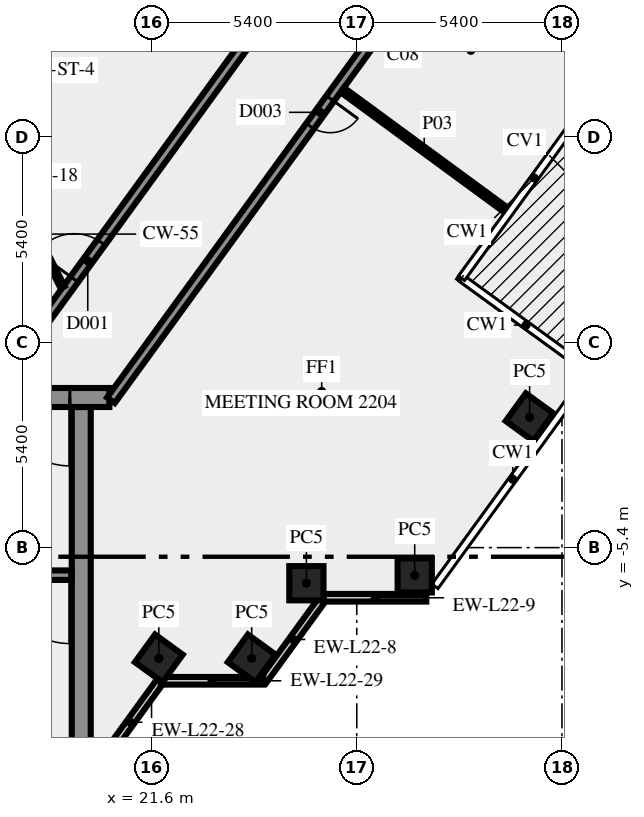
"""IFC4 building model, lengths in metres.
Left out: names, types, materials, properties, quantities, classifications, styles, units other than length and angle.
Written with IfcOpenShell. Run it as: python <this file> out.ifc"""

import sys

from ifc_helpers import new_model, si_unit, direction, frame, frame_2d, origin, origin_2d, place, context, subcontext, project, spatial, rectangle, extrude, element, fill, save


model = new_model("IFC4")
c1 = context("Model", 3, precision=1e-05, world=origin(), true_north=direction((0.0, 1.0)))
c2 = subcontext(c1, "Body", "Model", "MODEL_VIEW")
j1 = project(units=[si_unit("LENGTHUNIT", "METRE"), si_unit("PLANEANGLEUNIT", "RADIAN")], contexts=[c1])
p1 = place(None, origin())
s1 = spatial("IfcSite", under=j1, at=p1, CompositionType="ELEMENT")
p2 = place(p1, origin())
s2 = spatial("IfcBuilding", under=s1, at=p2, CompositionType="ELEMENT")
p3 = place(p2, frame((0.0, 0.0, 97.0)))
s3 = spatial("IfcBuildingStorey", under=s2, at=p3, CompositionType="ELEMENT", Elevation=97.0)
for number, where, z_axis, x_axis in (
    (1, (21.792, -8.315, 0.0), (0.0, 0.0, 1.0), (0.588, 0.809, 0.0)),
    (2, (24.235, -8.315, 0.0), (0.0, 0.0, 1.0), (0.588, 0.809, 0.0)),
    (3, (25.674, -6.337, 0.0), (0.0, 0.0, 1.0), (1.0, 0.0, 0.0)),
    (4, (28.525, -6.13, 0.0), (0.0, 0.0, 1.0), (1.0, 0.0, 0.0)),
    (5, (31.548, -1.969, 0.0), (0.0, 0.0, 1.0), (0.588, 0.809, 0.0)),
):
    element("IfcColumn", number, at=place(p3, frame(where, z_axis=z_axis, x_axis=x_axis)), inside=s3, PredefinedType="COLUMN", context=c2, shape_type="SweptSolid", body=[
        extrude(rectangle(XDim=0.9, YDim=0.9, at=origin_2d()), origin(), (0.0, 0.0, 1.0), 3.65),
    ])
p4 = place(p3, frame((24.533, -8.909, 0.0), z_axis=(0.0, 0.0, 1.0), x_axis=(0.587720002413, 0.809064397168, 0.0)))
e6 = element("IfcWall", 6, at=p4, inside=s3, PredefinedType="SOLIDWALL", context=c2, shape_type="SweptSolid", body=[
    extrude(rectangle(XDim=2.7, YDim=0.2, at=frame_2d((1.35, 0.0))), origin(), (0.0, 0.0, 1.0), 3.65),
])
p5 = place(p3, frame((26.13, -6.719, 0.0), z_axis=(0.0, 0.0, 1.0), x_axis=(1.0, 0.0, 0.0)))
e7 = element("IfcWall", 7, at=p5, inside=s3, PredefinedType="SOLIDWALL", context=c2, shape_type="SweptSolid", body=[
    extrude(rectangle(XDim=2.7, YDim=0.2, at=frame_2d((1.35, 0.0))), origin(), (0.0, 0.0, 1.0), 3.65),
])
p6 = place(p3, frame((20.253, -11.083, 0.0), z_axis=(0.0, 0.0, 1.0), x_axis=(0.587766567315, 0.809030569476, 0.0)))
e8 = element("IfcWall", 8, at=p6, inside=s3, PredefinedType="SOLIDWALL", context=c2, shape_type="SweptSolid", body=[
    extrude(rectangle(XDim=2.688, YDim=0.2, at=frame_2d((1.344, 0.0))), origin(), (0.0, 0.0, 1.0), 3.65),
])
p7 = place(p3, frame((21.843, -8.904, 0.0), z_axis=(0.0, 0.0, 1.0), x_axis=(1.0, 0.0, 0.0)))
e9 = element("IfcWall", 9, at=p7, inside=s3, PredefinedType="SOLIDWALL", context=c2, shape_type="SweptSolid", body=[
    extrude(rectangle(XDim=2.7, YDim=0.2, at=frame_2d((1.35, 0.0))), origin(), (0.0, 0.0, 1.0), 3.65),
])
p8 = place(p3, frame((19.75, -10.5, 0.0), z_axis=(0.0, 0.0, 1.0), x_axis=(0.0, 1.0, 0.0)))
e10 = element("IfcWall", 10, at=p8, inside=s3, PredefinedType="SHEAR", context=c2, shape_type="SweptSolid", body=[
    extrude(rectangle(XDim=8.8, YDim=0.5, at=frame_2d((4.4, 0.0))), origin(), (0.0, 0.0, 1.0), 3.65),
])
p9 = place(p3, frame((19.5, -6.125, 0.0), z_axis=(0.0, 0.0, 1.0), x_axis=(-1.0, 0.0, 0.0)))
e11 = element("IfcWall", 11, at=p9, inside=s3, PredefinedType="SHEAR", context=c2, shape_type="SweptSolid", body=[
    extrude(rectangle(XDim=8.05, YDim=0.25, at=frame_2d((4.025, 0.0))), origin(), (0.0, 0.0, 1.0), 3.65),
])
p10 = place(p9, frame((0.05, 0.0, 0.0)))
e12 = element("IfcOpeningElement", 12, at=p10, cuts=e11, PredefinedType="OPENING", context=c2, shape_type="SweptSolid", body=[
    extrude(rectangle(XDim=1.8, YDim=2.1, at=frame_2d((0.9, 1.05))), frame((0.0, 0.135, 0.0), z_axis=(0.0, -1.0, 0.0), x_axis=(1.0, 0.0, 0.0)), (0.0, 0.0, 1.0), 0.27),
])
p11 = place(p3, frame((20.49, -1.45, 0.0), z_axis=(0.0, 0.0, 1.0), x_axis=(-1.0, 0.0, 0.0)))
e13 = element("IfcWall", 13, at=p11, inside=s3, PredefinedType="SHEAR", context=c2, shape_type="SweptSolid", body=[
    extrude(rectangle(XDim=40.98, YDim=0.5, at=frame_2d((20.49, 0.0))), origin(), (0.0, 0.0, 1.0), 3.65),
])
p12 = place(p11, frame((38.14, 0.0, 0.0)))
e14 = element("IfcOpeningElement", 14, at=p12, cuts=e13, PredefinedType="OPENING", context=c2, shape_type="SweptSolid", body=[
    extrude(rectangle(XDim=1.8, YDim=2.1, at=frame_2d((0.9, 1.05))), frame((0.0, 0.26, 0.0), z_axis=(0.0, -1.0, 0.0), x_axis=(1.0, 0.0, 0.0)), (0.0, 0.0, 1.0), 0.52),
])
p13 = place(p11, frame((36.728, 0.0, 0.0)))
e15 = element("IfcOpeningElement", 15, at=p13, cuts=e13, PredefinedType="OPENING", context=c2, shape_type="SweptSolid", body=[
    extrude(rectangle(XDim=0.8, YDim=2.1, at=frame_2d((0.4, 1.05))), frame((0.0, 0.26, 0.0), z_axis=(0.0, -1.0, 0.0), x_axis=(1.0, 0.0, 0.0)), (0.0, 0.0, 1.0), 0.52),
])
p14 = place(p11, frame((35.153, 0.0, 0.0)))
e16 = element("IfcOpeningElement", 16, at=p14, cuts=e13, PredefinedType="OPENING", context=c2, shape_type="SweptSolid", body=[
    extrude(rectangle(XDim=0.8, YDim=2.1, at=frame_2d((0.4, 1.05))), frame((0.0, 0.26, 0.0), z_axis=(0.0, -1.0, 0.0), x_axis=(1.0, 0.0, 0.0)), (0.0, 0.0, 1.0), 0.52),
])
p15 = place(p11, frame((32.94, 0.0, 0.0)))
e17 = element("IfcOpeningElement", 17, at=p15, cuts=e13, PredefinedType="OPENING", context=c2, shape_type="SweptSolid", body=[
    extrude(rectangle(XDim=0.9, YDim=2.1, at=frame_2d((0.45, 1.05))), frame((0.0, 0.26, 0.0), z_axis=(0.0, -1.0, 0.0), x_axis=(1.0, 0.0, 0.0)), (0.0, 0.0, 1.0), 0.52),
])
p16 = place(p11, frame((19.59, 0.0, 0.0)))
e18 = element("IfcOpeningElement", 18, at=p16, cuts=e13, PredefinedType="OPENING", context=c2, shape_type="SweptSolid", body=[
    extrude(rectangle(XDim=2.0, YDim=2.1, at=frame_2d((1.0, 1.05))), frame((0.0, 0.26, 0.0), z_axis=(0.0, -1.0, 0.0), x_axis=(1.0, 0.0, 0.0)), (0.0, 0.0, 1.0), 0.52),
])
p17 = place(p11, frame((7.14, 0.0, 0.0)))
e19 = element("IfcOpeningElement", 19, at=p17, cuts=e13, PredefinedType="OPENING", context=c2, shape_type="SweptSolid", body=[
    extrude(rectangle(XDim=0.9, YDim=2.1, at=frame_2d((0.45, 1.05))), frame((0.0, 0.26, 0.0), z_axis=(0.0, -1.0, 0.0), x_axis=(1.0, 0.0, 0.0)), (0.0, 0.0, 1.0), 0.52),
])
p18 = place(p11, frame((4.19, 0.0, 0.0)))
e20 = element("IfcOpeningElement", 20, at=p18, cuts=e13, PredefinedType="OPENING", context=c2, shape_type="SweptSolid", body=[
    extrude(rectangle(XDim=0.9, YDim=2.1, at=frame_2d((0.45, 1.05))), frame((0.0, 0.26, 0.0), z_axis=(0.0, -1.0, 0.0), x_axis=(1.0, 0.0, 0.0)), (0.0, 0.0, 1.0), 0.52),
])
p19 = place(p11, frame((1.04, 0.0, 0.0)))
e21 = element("IfcOpeningElement", 21, at=p19, cuts=e13, PredefinedType="OPENING", context=c2, shape_type="SweptSolid", body=[
    extrude(rectangle(XDim=1.8, YDim=2.1, at=frame_2d((0.9, 1.05))), frame((0.0, 0.26, 0.0), z_axis=(0.0, -1.0, 0.0), x_axis=(1.0, 0.0, 0.0)), (0.0, 0.0, 1.0), 0.52),
])
p20 = place(p3, frame((17.545, -1.125, 0.0), z_axis=(0.0, 0.0, 1.0), x_axis=(0.587791430994, 0.80901250525, 0.0)))
e22 = element("IfcWall", 22, at=p20, inside=s3, PredefinedType="SOLIDWALL", context=c2, shape_type="SweptSolid", body=[
    extrude(rectangle(XDim=24.703, YDim=0.25, at=frame_2d((12.352, 0.0))), origin(), (0.0, 0.0, 1.0), 3.65),
])
p21 = place(p20, frame((3.442, 0.0, 0.0)))
e23 = element("IfcOpeningElement", 23, at=p21, cuts=e22, PredefinedType="OPENING", context=c2, shape_type="SweptSolid", body=[
    extrude(rectangle(XDim=1.2, YDim=2.1, at=frame_2d((0.6, 1.05))), frame((0.0, 0.135, 0.0), z_axis=(0.0, -1.0, 0.0), x_axis=(1.0, 0.0, 0.0)), (0.0, 0.0, 1.0), 0.27),
])
p22 = place(p20, frame((23.329, 0.0, 0.0)))
e24 = element("IfcOpeningElement", 24, at=p22, cuts=e22, PredefinedType="OPENING", context=c2, shape_type="SweptSolid", body=[
    extrude(rectangle(XDim=0.9, YDim=2.1, at=frame_2d((0.45, 1.05))), frame((0.0, 0.135, 0.0), z_axis=(0.0, -1.0, 0.0), x_axis=(1.0, 0.0, 0.0)), (0.0, 0.0, 1.0), 0.27),
])
p23 = place(p3, frame((34.062, 17.101, 0.0), z_axis=(0.0, 0.0, 1.0), x_axis=(-0.58778129431, -0.809019870003, 0.0)))
e25 = element("IfcWall", 25, at=p23, inside=s3, PredefinedType="SOLIDWALL", context=c2, shape_type="SweptSolid", body=[
    extrude(rectangle(XDim=23.021, YDim=0.25, at=frame_2d((11.51, 0.0))), origin(), (0.0, 0.0, 1.0), 3.65),
])
p24 = place(p23, frame((5.465, 0.0, 0.0)))
e26 = element("IfcOpeningElement", 26, at=p24, cuts=e25, PredefinedType="OPENING", context=c2, shape_type="SweptSolid", body=[
    extrude(rectangle(XDim=1.8, YDim=2.1, at=frame_2d((0.9, 1.05))), frame((0.0, 0.135, 0.0), z_axis=(0.0, -1.0, 0.0), x_axis=(1.0, 0.0, 0.0)), (0.0, 0.0, 1.0), 0.27),
])
p25 = place(p23, frame((13.205, 0.0, 0.0)))
e27 = element("IfcOpeningElement", 27, at=p25, cuts=e25, PredefinedType="OPENING", context=c2, shape_type="SweptSolid", body=[
    extrude(rectangle(XDim=0.9, YDim=2.1, at=frame_2d((0.45, 1.05))), frame((0.0, 0.135, 0.0), z_axis=(0.0, -1.0, 0.0), x_axis=(1.0, 0.0, 0.0)), (0.0, 0.0, 1.0), 0.27),
])
p26 = place(p3, frame((26.619, 6.643, 0.0), z_axis=(0.0, 0.0, 1.0), x_axis=(0.806280213972, -0.591533783107, 0.0)))
e28 = element("IfcWall", 28, at=p26, inside=s3, PredefinedType="PARTITIONING", context=c2, shape_type="SweptSolid", body=[
    extrude(rectangle(XDim=5.35, YDim=0.15, at=frame_2d((2.675, 0.0))), origin(), (0.0, 0.0, 1.0), 3.65),
])
p27 = place(p3, frame((18.0, 3.925, 0.0), z_axis=(0.0, 0.0, 1.0), x_axis=(0.453950796792, -0.891026752736, 0.0)))
e29 = element("IfcWall", 29, at=p27, inside=s3, PredefinedType="PARTITIONING", context=c2, shape_type="SweptSolid", body=[
    extrude(rectangle(XDim=2.778, YDim=0.12, at=frame_2d((1.389, 0.0))), origin(), (0.0, 0.0, 1.0), 3.65),
])
p28 = place(p10, origin())
e30 = element("IfcDoor", 30, at=p28, inside=s3, OperationType="DOUBLE_DOOR_SINGLE_SWING", PredefinedType="DOOR", context=c2, shape_type="SweptSolid", body=[
    extrude(rectangle(XDim=1.8, YDim=2.1, at=frame_2d((0.9, 1.05))), frame((0.0, 0.025, 0.0), z_axis=(0.0, -1.0, 0.0), x_axis=(1.0, 0.0, 0.0)), (0.0, 0.0, 1.0), 0.05),
])
fill(e12, e30)
p29 = place(p19, origin())
e31 = element("IfcDoor", 31, at=p29, inside=s3, OperationType="DOUBLE_DOOR_SINGLE_SWING", PredefinedType="DOOR", context=c2, shape_type="SweptSolid", body=[
    extrude(rectangle(XDim=1.8, YDim=2.1, at=frame_2d((0.9, 1.05))), frame((0.0, 0.025, 0.0), z_axis=(0.0, -1.0, 0.0), x_axis=(1.0, 0.0, 0.0)), (0.0, 0.0, 1.0), 0.05),
])
fill(e21, e31)
p30 = place(p21, origin())
e32 = element("IfcDoor", 32, at=p30, inside=s3, OperationType="SINGLE_SWING_LEFT", PredefinedType="DOOR", context=c2, shape_type="SweptSolid", body=[
    extrude(rectangle(XDim=1.2, YDim=2.1, at=frame_2d((0.6, 1.05))), frame((0.0, 0.025, 0.0), z_axis=(0.0, -1.0, 0.0), x_axis=(1.0, 0.0, 0.0)), (0.0, 0.0, 1.0), 0.05),
])
fill(e23, e32)
p31 = place(p25, origin())
e33 = element("IfcDoor", 33, at=p31, inside=s3, OperationType="SINGLE_SWING_LEFT", PredefinedType="DOOR", context=c2, shape_type="SweptSolid", body=[
    extrude(rectangle(XDim=0.9, YDim=2.1, at=frame_2d((0.45, 1.05))), frame((0.0, 0.025, 0.0), z_axis=(0.0, -1.0, 0.0), x_axis=(1.0, 0.0, 0.0)), (0.0, 0.0, 1.0), 0.05),
])
fill(e27, e33)
save(model, sys.argv[1])
